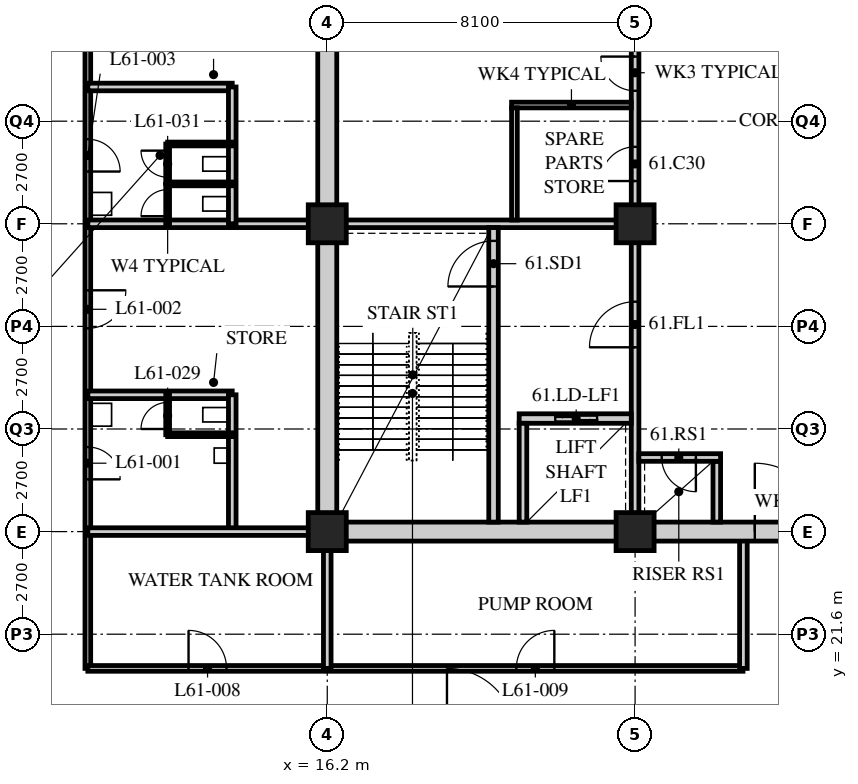
"""IFC4 building model, lengths in metres.
Left out: names, types, materials, properties, quantities, classifications, styles, units other than length and angle.
Written with IfcOpenShell. Run it as: python <this file> out.ifc"""

import sys

from ifc_helpers import new_model, si_unit, direction, frame, frame_2d, origin, origin_2d, place, context, subcontext, project, spatial, rectangle, hollow_rectangle, extrude, element, fill, save


model = new_model("IFC4")
c1 = context("Model", 3, precision=1e-05, world=origin(), true_north=direction((0.0, 1.0)))
c2 = subcontext(c1, "Body", "Model", "MODEL_VIEW")
j1 = project(units=[si_unit("LENGTHUNIT", "METRE"), si_unit("PLANEANGLEUNIT", "RADIAN")], contexts=[c1])
p1 = place(None, origin())
s1 = spatial("IfcSite", under=j1, at=p1, CompositionType="ELEMENT")
p2 = place(p1, origin())
s2 = spatial("IfcBuilding", under=s1, at=p2, CompositionType="ELEMENT")
p3 = place(p2, frame((0.0, 0.0, 235.2)))
s3 = spatial("IfcBuildingStorey", under=s2, at=p3, CompositionType="ELEMENT", Elevation=235.2)
for number, where, z_axis, x_axis in (
    (1, (16.2, 24.3, 0.0), (0.0, 0.0, 1.0), (1.0, 0.0, 0.0)),
    (2, (16.2, 32.4, 0.0), (0.0, 0.0, 1.0), (1.0, 0.0, 0.0)),
    (3, (24.3, 24.3, 0.0), (0.0, 0.0, 1.0), (1.0, 0.0, 0.0)),
    (4, (24.3, 32.4, 0.0), (0.0, 0.0, 1.0), (1.0, 0.0, 0.0)),
):
    element("IfcColumn", number, at=place(p3, frame(where, z_axis=z_axis, x_axis=x_axis)), inside=s3, PredefinedType="COLUMN", context=c2, shape_type="SweptSolid", body=[
        extrude(hollow_rectangle(XDim=1.0, YDim=1.0, WallThickness=0.1, at=origin_2d()), origin(), (0.0, 0.0, 1.0), 7.2),
    ])
p4 = place(p3, frame((9.9, 49.5, 0.0), z_axis=(0.0, 0.0, 1.0), x_axis=(0.0, -1.0, 0.0)))
e5 = element("IfcWall", 5, at=p4, inside=s3, PredefinedType="PARTITIONING", context=c2, shape_type="SweptSolid", body=[
    extrude(rectangle(XDim=28.8, YDim=0.15, at=frame_2d((14.4, 0.0))), origin(), (0.0, 0.0, 1.0), 6.95),
])
p5 = place(p4, frame((22.975, 0.0, 0.0)))
e6 = element("IfcOpeningElement", 6, at=p5, cuts=e5, PredefinedType="OPENING", context=c2, shape_type="SweptSolid", body=[
    extrude(rectangle(XDim=0.85, YDim=2.1, at=frame_2d((0.425, 1.05))), frame((0.0, 0.085, 0.0), z_axis=(0.0, -1.0, 0.0), x_axis=(1.0, 0.0, 0.0)), (0.0, 0.0, 1.0), 0.17),
])
p6 = place(p4, frame((18.85, 0.0, 0.0)))
e7 = element("IfcOpeningElement", 7, at=p6, cuts=e5, PredefinedType="OPENING", context=c2, shape_type="SweptSolid", body=[
    extrude(rectangle(XDim=1.0, YDim=2.1, at=frame_2d((0.5, 1.05))), frame((0.0, 0.085, 0.0), z_axis=(0.0, -1.0, 0.0), x_axis=(1.0, 0.0, 0.0)), (0.0, 0.0, 1.0), 0.17),
])
p7 = place(p4, frame((14.875, 0.0, 0.0)))
e8 = element("IfcOpeningElement", 8, at=p7, cuts=e5, PredefinedType="OPENING", context=c2, shape_type="SweptSolid", body=[
    extrude(rectangle(XDim=0.85, YDim=2.1, at=frame_2d((0.425, 1.05))), frame((0.0, 0.085, 0.0), z_axis=(0.0, -1.0, 0.0), x_axis=(1.0, 0.0, 0.0)), (0.0, 0.0, 1.0), 0.17),
])
p8 = place(p4, frame((10.75, 0.0, 0.0)))
e9 = element("IfcOpeningElement", 9, at=p8, cuts=e5, PredefinedType="OPENING", context=c2, shape_type="SweptSolid", body=[
    extrude(rectangle(XDim=1.0, YDim=2.1, at=frame_2d((0.5, 1.05))), frame((0.0, 0.085, 0.0), z_axis=(0.0, -1.0, 0.0), x_axis=(1.0, 0.0, 0.0)), (0.0, 0.0, 1.0), 0.17),
])
p9 = place(p3, frame((9.9, 20.7, 0.0), z_axis=(0.0, 0.0, 1.0), x_axis=(1.0, 0.0, 0.0)))
e10 = element("IfcWall", 10, at=p9, inside=s3, PredefinedType="PARTITIONING", context=c2, shape_type="SweptSolid", body=[
    extrude(rectangle(XDim=17.24, YDim=0.15, at=frame_2d((8.62, 0.0))), origin(), (0.0, 0.0, 1.0), 6.95),
])
p10 = place(p9, frame((2.65, 0.0, 0.0)))
e11 = element("IfcOpeningElement", 11, at=p10, cuts=e10, PredefinedType="OPENING", context=c2, shape_type="SweptSolid", body=[
    extrude(rectangle(XDim=1.0, YDim=2.1, at=frame_2d((0.5, 1.05))), frame((0.0, 0.085, 0.0), z_axis=(0.0, -1.0, 0.0), x_axis=(1.0, 0.0, 0.0)), (0.0, 0.0, 1.0), 0.17),
])
p11 = place(p9, frame((11.275, 0.0, 0.0)))
e12 = element("IfcOpeningElement", 12, at=p11, cuts=e10, PredefinedType="OPENING", context=c2, shape_type="SweptSolid", body=[
    extrude(rectangle(XDim=1.0, YDim=2.1, at=frame_2d((0.5, 1.05))), frame((0.0, 0.085, 0.0), z_axis=(0.0, -1.0, 0.0), x_axis=(1.0, 0.0, 0.0)), (0.0, 0.0, 1.0), 0.17),
])
p12 = place(p3, frame((9.9, 32.4, 0.0), z_axis=(0.0, 0.0, 1.0), x_axis=(1.0, 0.0, 0.0)))
e13 = element("IfcWall", 13, at=p12, inside=s3, PredefinedType="SOLIDWALL", context=c2, shape_type="SweptSolid", body=[
    extrude(rectangle(XDim=6.3, YDim=0.2, at=frame_2d((3.15, 0.0))), origin(), (0.0, 0.0, 1.0), 6.25),
])
p13 = place(p3, frame((9.9, 27.9, 0.0), z_axis=(0.0, 0.0, 1.0), x_axis=(1.0, 0.0, 0.0)))
e14 = element("IfcWall", 14, at=p13, inside=s3, PredefinedType="SOLIDWALL", context=c2, shape_type="SweptSolid", body=[
    extrude(rectangle(XDim=3.8, YDim=0.2, at=frame_2d((1.9, 0.0))), origin(), (0.0, 0.0, 1.0), 6.95),
])
p14 = place(p3, frame((13.7, 24.3, 0.0), z_axis=(0.0, 0.0, 1.0), x_axis=(0.0, 1.0, 0.0)))
e15 = element("IfcWall", 15, at=p14, inside=s3, PredefinedType="SOLIDWALL", context=c2, shape_type="SweptSolid", body=[
    extrude(rectangle(XDim=3.6, YDim=0.2, at=frame_2d((1.8, 0.0))), origin(), (0.0, 0.0, 1.0), 6.95),
])
p15 = place(p3, frame((9.9, 36.0, 0.0), z_axis=(0.0, 0.0, 1.0), x_axis=(1.0, 0.0, 0.0)))
e16 = element("IfcWall", 16, at=p15, inside=s3, PredefinedType="SOLIDWALL", context=c2, shape_type="SweptSolid", body=[
    extrude(rectangle(XDim=3.8, YDim=0.2, at=frame_2d((1.9, 0.0))), origin(), (0.0, 0.0, 1.0), 6.95),
])
p16 = place(p3, frame((13.7, 32.4, 0.0), z_axis=(0.0, 0.0, 1.0), x_axis=(0.0, 1.0, 0.0)))
e17 = element("IfcWall", 17, at=p16, inside=s3, PredefinedType="SOLIDWALL", context=c2, shape_type="SweptSolid", body=[
    extrude(rectangle(XDim=3.6, YDim=0.2, at=frame_2d((1.8, 0.0))), origin(), (0.0, 0.0, 1.0), 6.95),
])
p17 = place(p3, frame((16.2, 20.7, 0.0), z_axis=(0.0, 0.0, 1.0), x_axis=(0.0, 1.0, 0.0)))
e18 = element("IfcWall", 18, at=p17, inside=s3, PredefinedType="SOLIDWALL", context=c2, shape_type="SweptSolid", body=[
    extrude(rectangle(XDim=3.6, YDim=0.2, at=frame_2d((1.8, 0.0))), origin(), (0.0, 0.0, 1.0), 5.95),
])
p18 = place(p3, frame((27.15, 20.7, 0.0), z_axis=(0.0, 0.0, 1.0), x_axis=(0.0, 1.0, 0.0)))
e19 = element("IfcWall", 19, at=p18, inside=s3, PredefinedType="SOLIDWALL", context=c2, shape_type="SweptSolid", body=[
    extrude(rectangle(XDim=3.6, YDim=0.2, at=frame_2d((1.8, 0.0))), origin(), (0.0, 0.0, 1.0), 6.95),
])
p19 = place(p3, frame((9.9, 24.3, 0.0), z_axis=(0.0, 0.0, 1.0), x_axis=(1.0, 0.0, 0.0)))
e20 = element("IfcWall", 20, at=p19, inside=s3, PredefinedType="SOLIDWALL", context=c2, shape_type="SweptSolid", body=[
    extrude(rectangle(XDim=6.3, YDim=0.2, at=frame_2d((3.15, 0.0))), origin(), (0.0, 0.0, 1.0), 6.25),
])
p20 = place(p3, frame((12.0, 26.85, 0.0), z_axis=(0.0, 0.0, 1.0), x_axis=(0.0, 1.0, 0.0)))
e21 = element("IfcWall", 21, at=p20, inside=s3, PredefinedType="PARTITIONING", context=c2, shape_type="SweptSolid", body=[
    extrude(rectangle(XDim=1.05, YDim=0.1, at=frame_2d((0.525, 0.0))), origin(), (0.0, 0.0, 1.0), 6.95),
])
p21 = place(p20, frame((0.15, 0.0, 0.0)))
e22 = element("IfcOpeningElement", 22, at=p21, cuts=e21, PredefinedType="OPENING", context=c2, shape_type="SweptSolid", body=[
    extrude(rectangle(XDim=0.7, YDim=2.0, at=frame_2d((0.35, 1.0))), frame((0.0, 0.06, 0.0), z_axis=(0.0, -1.0, 0.0), x_axis=(1.0, 0.0, 0.0)), (0.0, 0.0, 1.0), 0.12),
])
p22 = place(p3, frame((12.0, 26.85, 0.0), z_axis=(0.0, 0.0, 1.0), x_axis=(1.0, 0.0, 0.0)))
e23 = element("IfcWall", 23, at=p22, inside=s3, PredefinedType="PARTITIONING", context=c2, shape_type="SweptSolid", body=[
    extrude(rectangle(XDim=1.7, YDim=0.1, at=frame_2d((0.85, 0.0))), origin(), (0.0, 0.0, 1.0), 6.95),
])
p23 = place(p3, frame((12.0, 32.4, 0.0), z_axis=(0.0, 0.0, 1.0), x_axis=(0.0, 1.0, 0.0)))
e24 = element("IfcWall", 24, at=p23, inside=s3, PredefinedType="PARTITIONING", context=c2, shape_type="SweptSolid", body=[
    extrude(rectangle(XDim=2.1, YDim=0.1, at=frame_2d((1.05, 0.0))), origin(), (0.0, 0.0, 1.0), 6.95),
])
p24 = place(p23, frame((0.2, 0.0, 0.0)))
e25 = element("IfcOpeningElement", 25, at=p24, cuts=e24, PredefinedType="OPENING", context=c2, shape_type="SweptSolid", body=[
    extrude(rectangle(XDim=0.7, YDim=2.0, at=frame_2d((0.35, 1.0))), frame((0.0, 0.06, 0.0), z_axis=(0.0, -1.0, 0.0), x_axis=(1.0, 0.0, 0.0)), (0.0, 0.0, 1.0), 0.12),
])
p25 = place(p23, frame((1.225, 0.0, 0.0)))
e26 = element("IfcOpeningElement", 26, at=p25, cuts=e24, PredefinedType="OPENING", context=c2, shape_type="SweptSolid", body=[
    extrude(rectangle(XDim=0.7, YDim=2.0, at=frame_2d((0.35, 1.0))), frame((0.0, 0.06, 0.0), z_axis=(0.0, -1.0, 0.0), x_axis=(1.0, 0.0, 0.0)), (0.0, 0.0, 1.0), 0.12),
])
for number, where, z_axis, x_axis in (
    (27, (12.0, 33.45, 0.0), (0.0, 0.0, 1.0), (1.0, 0.0, 0.0)),
    (28, (12.0, 34.5, 0.0), (0.0, 0.0, 1.0), (1.0, 0.0, 0.0)),
):
    element("IfcWall", number, at=place(p3, frame(where, z_axis=z_axis, x_axis=x_axis)), inside=s3, PredefinedType="PARTITIONING", context=c2, shape_type="SweptSolid", body=[
        extrude(rectangle(XDim=1.7, YDim=0.1, at=frame_2d((0.85, 0.0))), origin(), (0.0, 0.0, 1.0), 6.95),
    ])
p26 = place(p3, frame((15.95, 24.3, 0.0), z_axis=(0.0, 0.0, 1.0), x_axis=(1.0, 0.0, 0.0)))
e29 = element("IfcWall", 29, at=p26, inside=s3, PredefinedType="SOLIDWALL", context=c2, shape_type="SweptSolid", body=[
    extrude(rectangle(XDim=24.8, YDim=0.5, at=frame_2d((12.4, 0.0))), origin(), (0.0, 0.0, 1.0), 6.188),
])
p27 = place(p26, frame((11.5, 0.0, 0.0)))
e30 = element("IfcOpeningElement", 30, at=p27, cuts=e29, PredefinedType="OPENING", context=c2, shape_type="SweptSolid", body=[
    extrude(rectangle(XDim=1.8, YDim=2.4, at=frame_2d((0.9, 1.2))), frame((0.0, 0.26, 0.0), z_axis=(0.0, -1.0, 0.0), x_axis=(1.0, 0.0, 0.0)), (0.0, 0.0, 1.0), 0.52),
])
p28 = place(p3, frame((16.2, 24.55, 0.0), z_axis=(0.0, 0.0, 1.0), x_axis=(0.0, 1.0, 0.0)))
e31 = element("IfcWall", 31, at=p28, inside=s3, PredefinedType="SOLIDWALL", context=c2, shape_type="SweptSolid", body=[
    extrude(rectangle(XDim=15.7, YDim=0.5, at=frame_2d((7.85, 0.0))), origin(), (0.0, 0.0, 1.0), 5.95),
])
p29 = place(p3, frame((16.45, 32.4, 0.0), z_axis=(0.0, 0.0, 1.0), x_axis=(1.0, 0.0, 0.0)))
e32 = element("IfcWall", 32, at=p29, inside=s3, PredefinedType="SOLIDWALL", context=c2, shape_type="SweptSolid", body=[
    extrude(rectangle(XDim=7.95, YDim=0.2, at=frame_2d((3.975, 0.0))), origin(), (0.0, 0.0, 1.0), 6.25),
])
p30 = place(p3, frame((24.3, 24.55, 0.0), z_axis=(0.0, 0.0, 1.0), x_axis=(0.0, 1.0, 0.0)))
e33 = element("IfcWall", 33, at=p30, inside=s3, PredefinedType="SOLIDWALL", context=c2, shape_type="SweptSolid", body=[
    extrude(rectangle(XDim=7.75, YDim=0.2, at=frame_2d((3.875, 0.0))), origin(), (0.0, 0.0, 1.0), 6.25),
])
p31 = place(p30, frame((4.6, 0.0, 0.0)))
e34 = element("IfcOpeningElement", 34, at=p31, cuts=e33, PredefinedType="OPENING", context=c2, shape_type="SweptSolid", body=[
    extrude(rectangle(XDim=1.2, YDim=2.1, at=frame_2d((0.6, 1.05))), frame((0.0, 0.11, 0.0), z_axis=(0.0, -1.0, 0.0), x_axis=(1.0, 0.0, 0.0)), (0.0, 0.0, 1.0), 0.22),
])
p32 = place(p3, frame((20.575, 24.55, 0.0), z_axis=(0.0, 0.0, 1.0), x_axis=(0.0, 1.0, 0.0)))
e35 = element("IfcWall", 35, at=p32, inside=s3, PredefinedType="SOLIDWALL", context=c2, shape_type="SweptSolid", body=[
    extrude(rectangle(XDim=7.75, YDim=0.25, at=frame_2d((3.875, 0.0))), origin(), (0.0, 0.0, 1.0), 6.95),
])
p33 = place(p32, frame((6.2, 0.0, 0.0)))
e36 = element("IfcOpeningElement", 36, at=p33, cuts=e35, PredefinedType="OPENING", context=c2, shape_type="SweptSolid", body=[
    extrude(rectangle(XDim=1.2, YDim=2.1, at=frame_2d((0.6, 1.05))), frame((0.0, 0.135, 0.0), z_axis=(0.0, -1.0, 0.0), x_axis=(1.0, 0.0, 0.0)), (0.0, 0.0, 1.0), 0.27),
])
p34 = place(p3, frame((21.25, 27.275, 0.0), z_axis=(0.0, 0.0, 1.0), x_axis=(1.0, 0.0, 0.0)))
e37 = element("IfcWall", 37, at=p34, inside=s3, PredefinedType="SOLIDWALL", context=c2, shape_type="SweptSolid", body=[
    extrude(rectangle(XDim=2.95, YDim=0.25, at=frame_2d((1.475, 0.0))), origin(), (0.0, 0.0, 1.0), 6.95),
])
p35 = place(p34, frame((0.95, 0.0, 0.0)))
e38 = element("IfcOpeningElement", 38, at=p35, cuts=e37, PredefinedType="OPENING", context=c2, shape_type="SweptSolid", body=[
    extrude(rectangle(XDim=1.1, YDim=2.4, at=frame_2d((0.55, 1.2))), frame((0.0, 0.135, 0.0), z_axis=(0.0, -1.0, 0.0), x_axis=(1.0, 0.0, 0.0)), (0.0, 0.0, 1.0), 0.27),
])
p36 = place(p3, frame((21.35, 24.55, 0.0), z_axis=(0.0, 0.0, 1.0), x_axis=(0.0, 1.0, 0.0)))
e39 = element("IfcWall", 39, at=p36, inside=s3, PredefinedType="SOLIDWALL", context=c2, shape_type="SweptSolid", body=[
    extrude(rectangle(XDim=2.6, YDim=0.2, at=frame_2d((1.3, 0.0))), origin(), (0.0, 0.0, 1.0), 6.95),
])
p37 = place(p3, frame((26.45, 24.55, 0.0), z_axis=(0.0, 0.0, 1.0), x_axis=(0.0, 1.0, 0.0)))
e40 = element("IfcWall", 40, at=p37, inside=s3, PredefinedType="SOLIDWALL", context=c2, shape_type="SweptSolid", body=[
    extrude(rectangle(XDim=1.6, YDim=0.2, at=frame_2d((0.8, 0.0))), origin(), (0.0, 0.0, 1.0), 6.95),
])
p38 = place(p3, frame((24.4, 26.25, 0.0), z_axis=(0.0, 0.0, 1.0), x_axis=(1.0, 0.0, 0.0)))
e41 = element("IfcWall", 41, at=p38, inside=s3, PredefinedType="SOLIDWALL", context=c2, shape_type="SweptSolid", body=[
    extrude(rectangle(XDim=2.15, YDim=0.2, at=frame_2d((1.075, 0.0))), origin(), (0.0, 0.0, 1.0), 6.95),
])
p39 = place(p38, frame((0.6, 0.0, 0.0)))
e42 = element("IfcOpeningElement", 42, at=p39, cuts=e41, PredefinedType="OPENING", context=c2, shape_type="SweptSolid", body=[
    extrude(rectangle(XDim=0.9, YDim=2.1, at=frame_2d((0.45, 1.05))), frame((0.0, 0.11, 0.0), z_axis=(0.0, -1.0, 0.0), x_axis=(1.0, 0.0, 0.0)), (0.0, 0.0, 1.0), 0.22),
])
p40 = place(p3, frame((24.3, 32.5, 0.0), z_axis=(0.0, 0.0, 1.0), x_axis=(0.0, 1.0, 0.0)))
e43 = element("IfcWall", 43, at=p40, inside=s3, PredefinedType="PARTITIONING", context=c2, shape_type="SweptSolid", body=[
    extrude(rectangle(XDim=7.75, YDim=0.2, at=frame_2d((3.875, 0.0))), origin(), (0.0, 0.0, 1.0), 6.25),
])
p41 = place(p40, frame((1.025, 0.0, 0.0)))
e44 = element("IfcOpeningElement", 44, at=p41, cuts=e43, PredefinedType="OPENING", context=c2, shape_type="SweptSolid", body=[
    extrude(rectangle(XDim=0.9, YDim=2.1, at=frame_2d((0.45, 1.05))), frame((0.0, 0.11, 0.0), z_axis=(0.0, -1.0, 0.0), x_axis=(1.0, 0.0, 0.0)), (0.0, 0.0, 1.0), 0.22),
])
p42 = place(p40, frame((3.4, 0.0, 0.0)))
e45 = element("IfcOpeningElement", 45, at=p42, cuts=e43, PredefinedType="OPENING", context=c2, shape_type="SweptSolid", body=[
    extrude(rectangle(XDim=0.9, YDim=2.1, at=frame_2d((0.45, 1.05))), frame((0.0, 0.11, 0.0), z_axis=(0.0, -1.0, 0.0), x_axis=(1.0, 0.0, 0.0)), (0.0, 0.0, 1.0), 0.22),
])
p43 = place(p40, frame((5.8, 0.0, 0.0)))
e46 = element("IfcOpeningElement", 46, at=p43, cuts=e43, PredefinedType="OPENING", context=c2, shape_type="SweptSolid", body=[
    extrude(rectangle(XDim=0.9, YDim=2.1, at=frame_2d((0.45, 1.05))), frame((0.0, 0.11, 0.0), z_axis=(0.0, -1.0, 0.0), x_axis=(1.0, 0.0, 0.0)), (0.0, 0.0, 1.0), 0.22),
])
p44 = place(p3, frame((21.05, 35.525, 0.0), z_axis=(0.0, 0.0, 1.0), x_axis=(1.0, 0.0, 0.0)))
e47 = element("IfcWall", 47, at=p44, inside=s3, PredefinedType="PARTITIONING", context=c2, shape_type="SweptSolid", body=[
    extrude(rectangle(XDim=3.15, YDim=0.15, at=frame_2d((1.575, 0.0))), origin(), (0.0, 0.0, 1.0), 6.95),
])
p45 = place(p3, frame((21.125, 32.5, 0.0), z_axis=(0.0, 0.0, 1.0), x_axis=(0.0, 1.0, 0.0)))
e48 = element("IfcWall", 48, at=p45, inside=s3, PredefinedType="PARTITIONING", context=c2, shape_type="SweptSolid", body=[
    extrude(rectangle(XDim=2.95, YDim=0.15, at=frame_2d((1.475, 0.0))), origin(), (0.0, 0.0, 1.0), 6.95),
])
p46 = place(p5, origin())
e49 = element("IfcDoor", 49, at=p46, inside=s3, OperationType="SINGLE_SWING_RIGHT", PredefinedType="DOOR", context=c2, shape_type="SweptSolid", body=[
    extrude(rectangle(XDim=0.85, YDim=2.1, at=frame_2d((0.425, 1.05))), frame((0.0, 0.025, 0.0), z_axis=(0.0, -1.0, 0.0), x_axis=(1.0, 0.0, 0.0)), (0.0, 0.0, 1.0), 0.05),
])
fill(e6, e49)
p47 = place(p6, origin())
e50 = element("IfcDoor", 50, at=p47, inside=s3, OperationType="SINGLE_SWING_LEFT", PredefinedType="DOOR", context=c2, shape_type="SweptSolid", body=[
    extrude(rectangle(XDim=1.0, YDim=2.1, at=frame_2d((0.5, 1.05))), frame((0.0, 0.025, 0.0), z_axis=(0.0, -1.0, 0.0), x_axis=(1.0, 0.0, 0.0)), (0.0, 0.0, 1.0), 0.05),
])
fill(e7, e50)
p48 = place(p7, origin())
e51 = element("IfcDoor", 51, at=p48, inside=s3, OperationType="SINGLE_SWING_RIGHT", PredefinedType="DOOR", context=c2, shape_type="SweptSolid", body=[
    extrude(rectangle(XDim=0.85, YDim=2.1, at=frame_2d((0.425, 1.05))), frame((0.0, 0.025, 0.0), z_axis=(0.0, -1.0, 0.0), x_axis=(1.0, 0.0, 0.0)), (0.0, 0.0, 1.0), 0.05),
])
fill(e8, e51)
p49 = place(p10, origin())
e52 = element("IfcDoor", 52, at=p49, inside=s3, OperationType="SINGLE_SWING_LEFT", PredefinedType="DOOR", context=c2, shape_type="SweptSolid", body=[
    extrude(rectangle(XDim=1.0, YDim=2.1, at=frame_2d((0.5, 1.05))), frame((0.0, 0.025, 0.0), z_axis=(0.0, -1.0, 0.0), x_axis=(1.0, 0.0, 0.0)), (0.0, 0.0, 1.0), 0.05),
])
fill(e11, e52)
p50 = place(p11, origin())
e53 = element("IfcDoor", 53, at=p50, inside=s3, OperationType="SINGLE_SWING_RIGHT", PredefinedType="DOOR", context=c2, shape_type="SweptSolid", body=[
    extrude(rectangle(XDim=1.0, YDim=2.1, at=frame_2d((0.5, 1.05))), frame((0.0, 0.025, 0.0), z_axis=(0.0, -1.0, 0.0), x_axis=(1.0, 0.0, 0.0)), (0.0, 0.0, 1.0), 0.05),
])
fill(e12, e53)
p51 = place(p21, origin())
e54 = element("IfcDoor", 54, at=p51, inside=s3, OperationType="SINGLE_SWING_LEFT", PredefinedType="DOOR", context=c2, shape_type="SweptSolid", body=[
    extrude(rectangle(XDim=0.7, YDim=2.0, at=frame_2d((0.35, 1.0))), frame((0.0, 0.025, 0.0), z_axis=(0.0, -1.0, 0.0), x_axis=(1.0, 0.0, 0.0)), (0.0, 0.0, 1.0), 0.05),
])
fill(e22, e54)
p52 = place(p24, origin())
e55 = element("IfcDoor", 55, at=p52, inside=s3, OperationType="SINGLE_SWING_LEFT", PredefinedType="DOOR", context=c2, shape_type="SweptSolid", body=[
    extrude(rectangle(XDim=0.7, YDim=2.0, at=frame_2d((0.35, 1.0))), frame((0.0, 0.025, 0.0), z_axis=(0.0, -1.0, 0.0), x_axis=(1.0, 0.0, 0.0)), (0.0, 0.0, 1.0), 0.05),
])
fill(e25, e55)
p53 = place(p25, origin())
e56 = element("IfcDoor", 56, at=p53, inside=s3, OperationType="SINGLE_SWING_RIGHT", PredefinedType="DOOR", context=c2, shape_type="SweptSolid", body=[
    extrude(rectangle(XDim=0.7, YDim=2.0, at=frame_2d((0.35, 1.0))), frame((0.0, 0.025, 0.0), z_axis=(0.0, -1.0, 0.0), x_axis=(1.0, 0.0, 0.0)), (0.0, 0.0, 1.0), 0.05),
])
fill(e26, e56)
p54 = place(p41, origin())
e57 = element("IfcDoor", 57, at=p54, inside=s3, OperationType="SINGLE_SWING_LEFT", PredefinedType="DOOR", context=c2, shape_type="SweptSolid", body=[
    extrude(rectangle(XDim=0.9, YDim=2.1, at=frame_2d((0.45, 1.05))), frame((0.0, 0.025, 0.0), z_axis=(0.0, -1.0, 0.0), x_axis=(1.0, 0.0, 0.0)), (0.0, 0.0, 1.0), 0.05),
])
fill(e44, e57)
p55 = place(p42, origin())
e58 = element("IfcDoor", 58, at=p55, inside=s3, OperationType="SINGLE_SWING_RIGHT", PredefinedType="DOOR", context=c2, shape_type="SweptSolid", body=[
    extrude(rectangle(XDim=0.9, YDim=2.1, at=frame_2d((0.45, 1.05))), frame((0.0, 0.025, 0.0), z_axis=(0.0, -1.0, 0.0), x_axis=(1.0, 0.0, 0.0)), (0.0, 0.0, 1.0), 0.05),
])
fill(e45, e58)
p56 = place(p33, origin())
e59 = element("IfcDoor", 59, at=p56, inside=s3, OperationType="SINGLE_SWING_LEFT", PredefinedType="DOOR", context=c2, shape_type="SweptSolid", body=[
    extrude(rectangle(XDim=1.2, YDim=2.1, at=frame_2d((0.6, 1.05))), frame((0.0, 0.025, 0.0), z_axis=(0.0, -1.0, 0.0), x_axis=(1.0, 0.0, 0.0)), (0.0, 0.0, 1.0), 0.05),
])
fill(e36, e59)
p57 = place(p31, origin())
e60 = element("IfcDoor", 60, at=p57, inside=s3, OperationType="SINGLE_SWING_LEFT", PredefinedType="DOOR", context=c2, shape_type="SweptSolid", body=[
    extrude(rectangle(XDim=1.2, YDim=2.1, at=frame_2d((0.6, 1.05))), frame((0.0, 0.025, 0.0), z_axis=(0.0, -1.0, 0.0), x_axis=(1.0, 0.0, 0.0)), (0.0, 0.0, 1.0), 0.05),
])
fill(e34, e60)
p58 = place(p39, origin())
e61 = element("IfcDoor", 61, at=p58, inside=s3, OperationType="SINGLE_SWING_LEFT", PredefinedType="DOOR", context=c2, shape_type="SweptSolid", body=[
    extrude(rectangle(XDim=0.9, YDim=2.1, at=frame_2d((0.45, 1.05))), frame((0.0, 0.025, 0.0), z_axis=(0.0, -1.0, 0.0), x_axis=(1.0, 0.0, 0.0)), (0.0, 0.0, 1.0), 0.05),
])
fill(e42, e61)
p59 = place(p35, origin())
e62 = element("IfcDoor", 62, at=p59, inside=s3, OperationType="DOUBLE_DOOR_SLIDING", PredefinedType="DOOR", context=c2, shape_type="SweptSolid", body=[
    extrude(rectangle(XDim=1.1, YDim=2.4, at=frame_2d((0.55, 1.2))), frame((0.0, 0.025, 0.0), z_axis=(0.0, -1.0, 0.0), x_axis=(1.0, 0.0, 0.0)), (0.0, 0.0, 1.0), 0.05),
])
fill(e38, e62)
p60 = place(p27, origin())
e63 = element("IfcDoor", 63, at=p60, inside=s3, OperationType="DOUBLE_DOOR_SINGLE_SWING", PredefinedType="DOOR", context=c2, shape_type="SweptSolid", body=[
    extrude(rectangle(XDim=1.8, YDim=2.4, at=frame_2d((0.9, 1.2))), frame((0.0, 0.025, 0.0), z_axis=(0.0, -1.0, 0.0), x_axis=(1.0, 0.0, 0.0)), (0.0, 0.0, 1.0), 0.05),
])
fill(e30, e63)
save(model, sys.argv[1])
